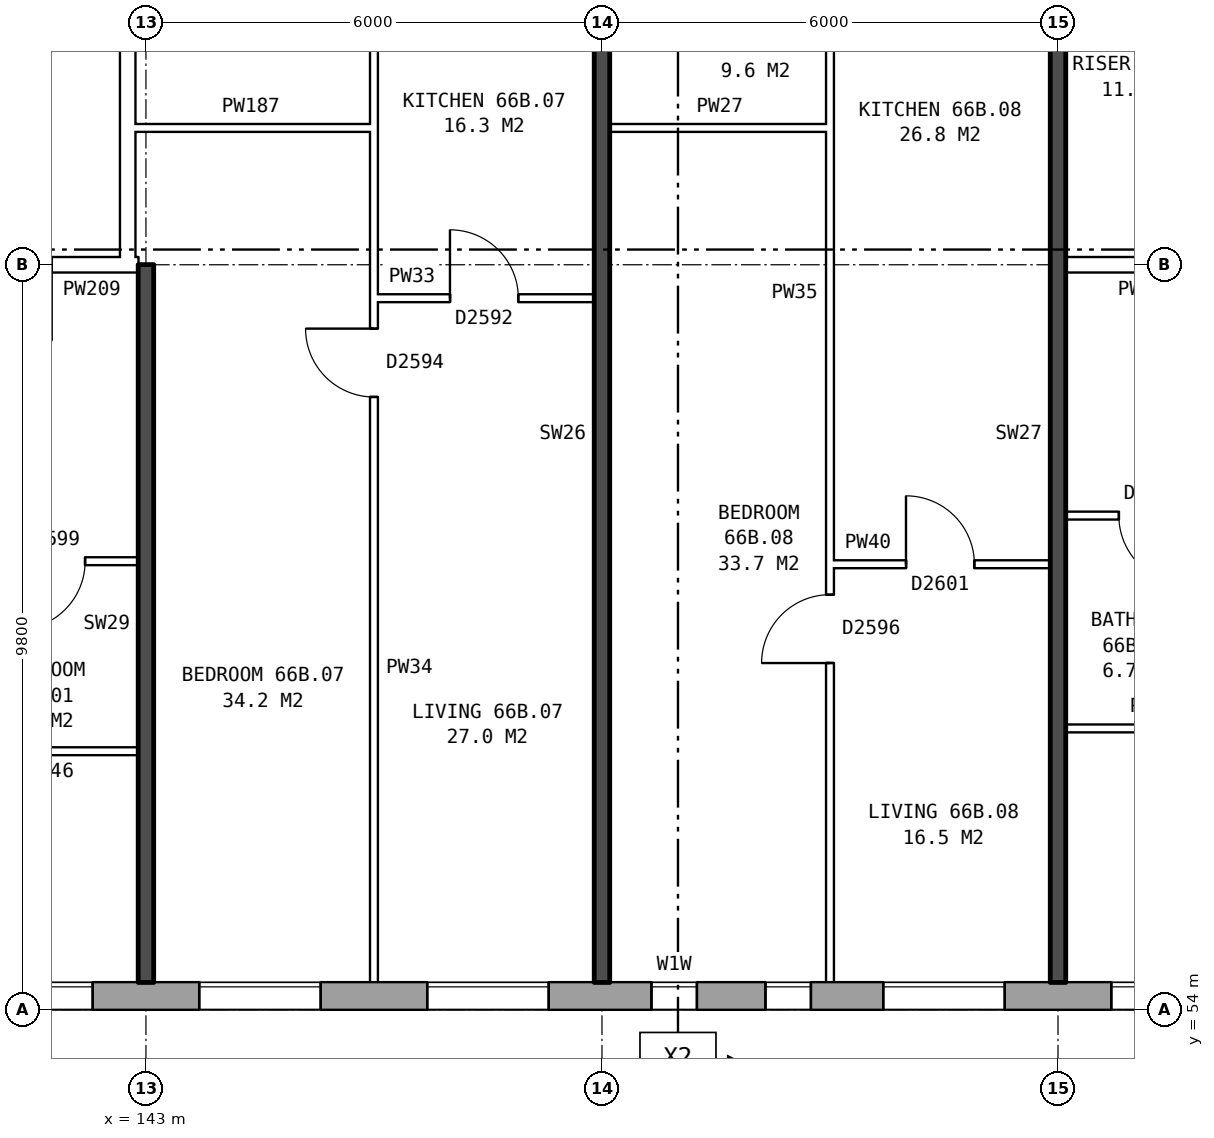
"""IFC4 building model, lengths in metres.
Left out: names, types, materials, properties, quantities, classifications, styles, units other than length and angle.
Written with IfcOpenShell. Run it as: python <this file> out.ifc"""

import sys

from ifc_helpers import new_model, si_unit, direction, frame, frame_2d, origin, place, context, subcontext, project, spatial, rectangle, extrude, element, fill, save


model = new_model("IFC4")
c1 = context("Model", 3, precision=1e-05, world=origin(), true_north=direction((0.0, 1.0)))
c2 = subcontext(c1, "Body", "Model", "MODEL_VIEW")
j1 = project(units=[si_unit("LENGTHUNIT", "METRE"), si_unit("PLANEANGLEUNIT", "RADIAN")], contexts=[c1])
p1 = place(None, origin())
s1 = spatial("IfcSite", under=j1, at=p1, CompositionType="ELEMENT")
p2 = place(p1, origin())
s2 = spatial("IfcBuilding", under=s1, at=p2, CompositionType="ELEMENT")
p3 = place(p2, frame((0.0, 0.0, 233.8)))
s3 = spatial("IfcBuildingStorey", under=s2, at=p3, CompositionType="ELEMENT", Elevation=233.8)
p4 = place(p3, frame((132.05, 54.18, 0.0), z_axis=(0.0, 0.0, 1.0), x_axis=(1.0, 0.0, 0.0)))
e1 = element("IfcWall", 1, at=p4, inside=s3, PredefinedType="STANDARD", context=c2, shape_type="SweptSolid", body=[
    extrude(rectangle(XDim=33.875, YDim=0.36, at=frame_2d((16.938, 0.0))), origin(), (0.0, 0.0, 1.0), 2.85),
])
p5 = place(p4, frame((2.65, 0.0, 0.8)))
e2 = element("IfcOpeningElement", 2, at=p5, cuts=e1, PredefinedType="OPENING", context=c2, shape_type="SweptSolid", body=[
    extrude(rectangle(XDim=1.6, YDim=1.8, at=frame_2d((0.8, 0.9))), frame((0.0, 0.19, 0.0), z_axis=(0.0, -1.0, 0.0), x_axis=(1.0, 0.0, 0.0)), (0.0, 0.0, 1.0), 0.38),
])
p6 = place(p4, frame((5.65, 0.0, 0.8)))
e3 = element("IfcOpeningElement", 3, at=p6, cuts=e1, PredefinedType="OPENING", context=c2, shape_type="SweptSolid", body=[
    extrude(rectangle(XDim=1.6, YDim=1.8, at=frame_2d((0.8, 0.9))), frame((0.0, 0.19, 0.0), z_axis=(0.0, -1.0, 0.0), x_axis=(1.0, 0.0, 0.0)), (0.0, 0.0, 1.0), 0.38),
])
p7 = place(p4, frame((8.65, 0.0, 0.8)))
e4 = element("IfcOpeningElement", 4, at=p7, cuts=e1, PredefinedType="OPENING", context=c2, shape_type="SweptSolid", body=[
    extrude(rectangle(XDim=1.6, YDim=1.8, at=frame_2d((0.8, 0.9))), frame((0.0, 0.19, 0.0), z_axis=(0.0, -1.0, 0.0), x_axis=(1.0, 0.0, 0.0)), (0.0, 0.0, 1.0), 0.38),
])
p8 = place(p4, frame((11.65, 0.0, 0.8)))
e5 = element("IfcOpeningElement", 5, at=p8, cuts=e1, PredefinedType="OPENING", context=c2, shape_type="SweptSolid", body=[
    extrude(rectangle(XDim=1.6, YDim=1.8, at=frame_2d((0.8, 0.9))), frame((0.0, 0.19, 0.0), z_axis=(0.0, -1.0, 0.0), x_axis=(1.0, 0.0, 0.0)), (0.0, 0.0, 1.0), 0.38),
])
p9 = place(p4, frame((14.65, 0.0, 0.8)))
e6 = element("IfcOpeningElement", 6, at=p9, cuts=e1, PredefinedType="OPENING", context=c2, shape_type="SweptSolid", body=[
    extrude(rectangle(XDim=1.6, YDim=1.8, at=frame_2d((0.8, 0.9))), frame((0.0, 0.19, 0.0), z_axis=(0.0, -1.0, 0.0), x_axis=(1.0, 0.0, 0.0)), (0.0, 0.0, 1.0), 0.38),
])
p10 = place(p4, frame((17.6, 0.0, 0.15)))
e7 = element("IfcOpeningElement", 7, at=p10, cuts=e1, PredefinedType="OPENING", context=c2, shape_type="SweptSolid", body=[
    extrude(rectangle(XDim=0.6, YDim=0.9, at=frame_2d((0.3, 0.45))), frame((0.0, 0.19, 0.0), z_axis=(0.0, -1.0, 0.0), x_axis=(1.0, 0.0, 0.0)), (0.0, 0.0, 1.0), 0.38),
])
p11 = place(p4, frame((20.65, 0.0, 0.8)))
e8 = element("IfcOpeningElement", 8, at=p11, cuts=e1, PredefinedType="OPENING", context=c2, shape_type="SweptSolid", body=[
    extrude(rectangle(XDim=1.6, YDim=1.8, at=frame_2d((0.8, 0.9))), frame((0.0, 0.19, 0.0), z_axis=(0.0, -1.0, 0.0), x_axis=(1.0, 0.0, 0.0)), (0.0, 0.0, 1.0), 0.38),
])
p12 = place(p4, frame((23.65, 0.0, 0.8)))
e9 = element("IfcOpeningElement", 9, at=p12, cuts=e1, PredefinedType="OPENING", context=c2, shape_type="SweptSolid", body=[
    extrude(rectangle(XDim=1.6, YDim=1.8, at=frame_2d((0.8, 0.9))), frame((0.0, 0.19, 0.0), z_axis=(0.0, -1.0, 0.0), x_axis=(1.0, 0.0, 0.0)), (0.0, 0.0, 1.0), 0.38),
])
p13 = place(p4, frame((26.65, 0.0, 0.8)))
e10 = element("IfcOpeningElement", 10, at=p13, cuts=e1, PredefinedType="OPENING", context=c2, shape_type="SweptSolid", body=[
    extrude(rectangle(XDim=1.6, YDim=1.8, at=frame_2d((0.8, 0.9))), frame((0.0, 0.19, 0.0), z_axis=(0.0, -1.0, 0.0), x_axis=(1.0, 0.0, 0.0)), (0.0, 0.0, 1.0), 0.38),
])
p14 = place(p4, frame((29.65, 0.0, 0.8)))
e11 = element("IfcOpeningElement", 11, at=p14, cuts=e1, PredefinedType="OPENING", context=c2, shape_type="SweptSolid", body=[
    extrude(rectangle(XDim=1.6, YDim=1.8, at=frame_2d((0.8, 0.9))), frame((0.0, 0.19, 0.0), z_axis=(0.0, -1.0, 0.0), x_axis=(1.0, 0.0, 0.0)), (0.0, 0.0, 1.0), 0.38),
])
p15 = place(p4, frame((19.1, 0.0, 1.65)))
e12 = element("IfcOpeningElement", 12, at=p15, cuts=e1, PredefinedType="OPENING", context=c2, shape_type="SweptSolid", body=[
    extrude(rectangle(XDim=0.6, YDim=0.9, at=frame_2d((0.3, 0.45))), frame((0.0, 0.19, 0.0), z_axis=(0.0, -1.0, 0.0), x_axis=(1.0, 0.0, 0.0)), (0.0, 0.0, 1.0), 0.38),
])
p16 = place(p3, frame((142.76, 63.9, 0.0), z_axis=(0.0, 0.0, 1.0), x_axis=(0.0, 1.0, 0.0)))
e13 = element("IfcWall", 13, at=p16, inside=s3, PredefinedType="PARTITIONING", context=c2, shape_type="SweptSolid", body=[
    extrude(rectangle(XDim=12.2, YDim=0.2, at=frame_2d((6.1, 0.0))), origin(), (0.0, 0.0, 1.0), 2.85),
])
p17 = place(p16, frame((5.1, 0.0, 0.0)))
e14 = element("IfcOpeningElement", 14, at=p17, cuts=e13, PredefinedType="OPENING", context=c2, shape_type="SweptSolid", body=[
    extrude(rectangle(XDim=2.0, YDim=2.1, at=frame_2d((1.0, 1.05))), frame((0.0, 0.11, 0.0), z_axis=(0.0, -1.0, 0.0), x_axis=(1.0, 0.0, 0.0)), (0.0, 0.0, 1.0), 0.22),
])
for number, where, z_axis, x_axis in (
    (15, (140.6, 57.4, 0.0), (0.0, 0.0, 1.0), (1.0, 0.0, 0.0)),
    (16, (155.1, 57.7, 0.0), (0.0, 0.0, 1.0), (1.0, 0.0, 0.0)),
):
    element("IfcWall", number, at=place(p3, frame(where, z_axis=z_axis, x_axis=x_axis)), inside=s3, PredefinedType="PARTITIONING", context=c2, shape_type="SweptSolid", body=[
        extrude(rectangle(XDim=2.3, YDim=0.1, at=frame_2d((1.15, 0.0))), origin(), (0.0, 0.0, 1.0), 2.85),
    ])
p18 = place(p3, frame((152.0, 59.86, 0.0), z_axis=(0.0, 0.0, 1.0), x_axis=(1.0, 0.0, 0.0)))
e17 = element("IfcWall", 17, at=p18, inside=s3, PredefinedType="PARTITIONING", context=c2, shape_type="SweptSolid", body=[
    extrude(rectangle(XDim=2.9, YDim=0.1, at=frame_2d((1.45, 0.0))), origin(), (0.0, 0.0, 1.0), 2.85),
])
p19 = place(p18, frame((1.0, 0.0, 0.0)))
e18 = element("IfcOpeningElement", 18, at=p19, cuts=e17, PredefinedType="OPENING", context=c2, shape_type="SweptSolid", body=[
    extrude(rectangle(XDim=0.9, YDim=2.1, at=frame_2d((0.45, 1.05))), frame((0.0, 0.06, 0.0), z_axis=(0.0, -1.0, 0.0), x_axis=(1.0, 0.0, 0.0)), (0.0, 0.0, 1.0), 0.12),
])
p20 = place(p3, frame((137.1, 59.9, 0.0), z_axis=(0.0, 0.0, 1.0), x_axis=(1.0, 0.0, 0.0)))
e19 = element("IfcWall", 19, at=p20, inside=s3, PredefinedType="PARTITIONING", context=c2, shape_type="SweptSolid", body=[
    extrude(rectangle(XDim=5.8, YDim=0.1, at=frame_2d((2.9, 0.0))), origin(), (0.0, 0.0, 1.0), 2.85),
])
p21 = place(p20, frame((1.3, 0.0, 0.0)))
e20 = element("IfcOpeningElement", 20, at=p21, cuts=e19, PredefinedType="OPENING", context=c2, shape_type="SweptSolid", body=[
    extrude(rectangle(XDim=0.9, YDim=2.1, at=frame_2d((0.45, 1.05))), frame((0.0, 0.06, 0.0), z_axis=(0.0, -1.0, 0.0), x_axis=(1.0, 0.0, 0.0)), (0.0, 0.0, 1.0), 0.12),
])
p22 = place(p20, frame((4.2, 0.0, 0.0)))
e21 = element("IfcOpeningElement", 21, at=p22, cuts=e19, PredefinedType="OPENING", context=c2, shape_type="SweptSolid", body=[
    extrude(rectangle(XDim=0.9, YDim=2.1, at=frame_2d((0.45, 1.05))), frame((0.0, 0.06, 0.0), z_axis=(0.0, -1.0, 0.0), x_axis=(1.0, 0.0, 0.0)), (0.0, 0.0, 1.0), 0.12),
])
p23 = place(p3, frame((155.1, 60.5, 0.0), z_axis=(0.0, 0.0, 1.0), x_axis=(1.0, 0.0, 0.0)))
e22 = element("IfcWall", 22, at=p23, inside=s3, PredefinedType="PARTITIONING", context=c2, shape_type="SweptSolid", body=[
    extrude(rectangle(XDim=5.8, YDim=0.1, at=frame_2d((2.9, 0.0))), origin(), (0.0, 0.0, 1.0), 2.85),
])
p24 = place(p23, frame((3.6, 0.0, 0.0)))
e23 = element("IfcOpeningElement", 23, at=p24, cuts=e22, PredefinedType="OPENING", context=c2, shape_type="SweptSolid", body=[
    extrude(rectangle(XDim=0.9, YDim=2.1, at=frame_2d((0.45, 1.05))), frame((0.0, 0.06, 0.0), z_axis=(0.0, -1.0, 0.0), x_axis=(1.0, 0.0, 0.0)), (0.0, 0.0, 1.0), 0.12),
])
p25 = place(p23, frame((0.7, 0.0, 0.0)))
e24 = element("IfcOpeningElement", 24, at=p25, cuts=e22, PredefinedType="OPENING", context=c2, shape_type="SweptSolid", body=[
    extrude(rectangle(XDim=0.9, YDim=2.1, at=frame_2d((0.45, 1.05))), frame((0.0, 0.06, 0.0), z_axis=(0.0, -1.0, 0.0), x_axis=(1.0, 0.0, 0.0)), (0.0, 0.0, 1.0), 0.12),
])
p26 = place(p3, frame((146.0, 63.36, 0.0), z_axis=(0.0, 0.0, 1.0), x_axis=(1.0, 0.0, 0.0)))
e25 = element("IfcWall", 25, at=p26, inside=s3, PredefinedType="PARTITIONING", context=c2, shape_type="SweptSolid", body=[
    extrude(rectangle(XDim=2.9, YDim=0.1, at=frame_2d((1.45, 0.0))), origin(), (0.0, 0.0, 1.0), 2.85),
])
p27 = place(p26, frame((1.0, 0.0, 0.0)))
e26 = element("IfcOpeningElement", 26, at=p27, cuts=e25, PredefinedType="OPENING", context=c2, shape_type="SweptSolid", body=[
    extrude(rectangle(XDim=0.9, YDim=2.1, at=frame_2d((0.45, 1.05))), frame((0.0, 0.06, 0.0), z_axis=(0.0, -1.0, 0.0), x_axis=(1.0, 0.0, 0.0)), (0.0, 0.0, 1.0), 0.12),
])
p28 = place(p3, frame((139.76, 63.8, 0.0), z_axis=(0.0, 0.0, 1.0), x_axis=(1.0, 0.0, 0.0)))
e27 = element("IfcWall", 27, at=p28, inside=s3, PredefinedType="PARTITIONING", context=c2, shape_type="SweptSolid", body=[
    extrude(rectangle(XDim=3.0, YDim=0.2, at=frame_2d((1.5, 0.0))), origin(), (0.0, 0.0, 1.0), 2.85),
])
p29 = place(p28, frame((1.0, 0.0, 0.0)))
e28 = element("IfcOpeningElement", 28, at=p29, cuts=e27, PredefinedType="OPENING", context=c2, shape_type="SweptSolid", body=[
    extrude(rectangle(XDim=1.0, YDim=2.1, at=frame_2d((0.5, 1.05))), frame((0.0, 0.11, 0.0), z_axis=(0.0, -1.0, 0.0), x_axis=(1.0, 0.0, 0.0)), (0.0, 0.0, 1.0), 0.22),
])
p30 = place(p3, frame((142.76, 63.8, 0.0), z_axis=(0.0, 0.0, 1.0), x_axis=(1.0, 0.0, 0.0)))
e29 = element("IfcWall", 29, at=p30, inside=s3, PredefinedType="PARTITIONING", context=c2, shape_type="SweptSolid", body=[
    extrude(rectangle(XDim=0.14, YDim=0.2, at=frame_2d((0.07, 0.0))), origin(), (0.0, 0.0, 1.0), 2.85),
])
p31 = place(p3, frame((155.1, 63.8, 0.0), z_axis=(0.0, 0.0, 1.0), x_axis=(1.0, 0.0, 0.0)))
e30 = element("IfcWall", 30, at=p31, inside=s3, PredefinedType="PARTITIONING", context=c2, shape_type="SweptSolid", body=[
    extrude(rectangle(XDim=2.14, YDim=0.2, at=frame_2d((1.07, 0.0))), origin(), (0.0, 0.0, 1.0), 2.85),
])
p32 = place(p3, frame((142.76, 65.6, 0.0), z_axis=(0.0, 0.0, 1.0), x_axis=(1.0, 0.0, 0.0)))
e31 = element("IfcWall", 31, at=p32, inside=s3, PredefinedType="PARTITIONING", context=c2, shape_type="SweptSolid", body=[
    extrude(rectangle(XDim=3.24, YDim=0.1, at=frame_2d((1.62, 0.0))), origin(), (0.0, 0.0, 1.0), 2.85),
])
p33 = place(p3, frame((149.1, 65.6, 0.0), z_axis=(0.0, 0.0, 1.0), x_axis=(1.0, 0.0, 0.0)))
e32 = element("IfcWall", 32, at=p33, inside=s3, PredefinedType="PARTITIONING", context=c2, shape_type="SweptSolid", body=[
    extrude(rectangle(XDim=2.9, YDim=0.1, at=frame_2d((1.45, 0.0))), origin(), (0.0, 0.0, 1.0), 2.85),
])
p34 = place(p3, frame((143.0, 54.36, 0.0), z_axis=(0.0, 0.0, 1.0), x_axis=(0.0, 1.0, 0.0)))
e33 = element("IfcWall", 33, at=p34, inside=s3, PredefinedType="SOLIDWALL", context=c2, shape_type="SweptSolid", body=[
    extrude(rectangle(XDim=9.44, YDim=0.2, at=frame_2d((4.72, 0.0))), origin(), (0.0, 0.0, 1.0), 2.85),
])
p35 = place(p3, frame((146.0, 54.36, 0.0), z_axis=(0.0, 0.0, 1.0), x_axis=(0.0, 1.0, 0.0)))
e34 = element("IfcWall", 34, at=p35, inside=s3, PredefinedType="PARTITIONING", context=c2, shape_type="SweptSolid", body=[
    extrude(rectangle(XDim=14.34, YDim=0.1, at=frame_2d((7.17, 0.0))), origin(), (0.0, 0.0, 1.0), 2.85),
])
p36 = place(p35, frame((7.7, 0.0, 0.0)))
e35 = element("IfcOpeningElement", 35, at=p36, cuts=e34, PredefinedType="OPENING", context=c2, shape_type="SweptSolid", body=[
    extrude(rectangle(XDim=0.9, YDim=2.1, at=frame_2d((0.45, 1.05))), frame((0.0, 0.06, 0.0), z_axis=(0.0, -1.0, 0.0), x_axis=(1.0, 0.0, 0.0)), (0.0, 0.0, 1.0), 0.12),
])
p37 = place(p35, frame((13.04, 0.0, 0.0)))
e36 = element("IfcOpeningElement", 36, at=p37, cuts=e34, PredefinedType="OPENING", context=c2, shape_type="SweptSolid", body=[
    extrude(rectangle(XDim=0.9, YDim=2.1, at=frame_2d((0.45, 1.05))), frame((0.0, 0.06, 0.0), z_axis=(0.0, -1.0, 0.0), x_axis=(1.0, 0.0, 0.0)), (0.0, 0.0, 1.0), 0.12),
])
p38 = place(p3, frame((149.0, 54.36, 0.0), z_axis=(0.0, 0.0, 1.0), x_axis=(0.0, 1.0, 0.0)))
e37 = element("IfcWall", 37, at=p38, inside=s3, PredefinedType="SOLIDWALL", context=c2, shape_type="SweptSolid", body=[
    extrude(rectangle(XDim=14.44, YDim=0.2, at=frame_2d((7.22, 0.0))), origin(), (0.0, 0.0, 1.0), 2.85),
])
p39 = place(p3, frame((152.0, 54.36, 0.0), z_axis=(0.0, 0.0, 1.0), x_axis=(0.0, 1.0, 0.0)))
e38 = element("IfcWall", 38, at=p39, inside=s3, PredefinedType="PARTITIONING", context=c2, shape_type="SweptSolid", body=[
    extrude(rectangle(XDim=14.34, YDim=0.1, at=frame_2d((7.17, 0.0))), origin(), (0.0, 0.0, 1.0), 2.85),
])
p40 = place(p39, frame((4.2, 0.0, 0.0)))
e39 = element("IfcOpeningElement", 39, at=p40, cuts=e38, PredefinedType="OPENING", context=c2, shape_type="SweptSolid", body=[
    extrude(rectangle(XDim=0.9, YDim=2.1, at=frame_2d((0.45, 1.05))), frame((0.0, 0.06, 0.0), z_axis=(0.0, -1.0, 0.0), x_axis=(1.0, 0.0, 0.0)), (0.0, 0.0, 1.0), 0.12),
])
p41 = place(p39, frame((13.04, 0.0, 0.0)))
e40 = element("IfcOpeningElement", 40, at=p41, cuts=e38, PredefinedType="OPENING", context=c2, shape_type="SweptSolid", body=[
    extrude(rectangle(XDim=0.9, YDim=2.1, at=frame_2d((0.45, 1.05))), frame((0.0, 0.06, 0.0), z_axis=(0.0, -1.0, 0.0), x_axis=(1.0, 0.0, 0.0)), (0.0, 0.0, 1.0), 0.12),
])
p42 = place(p3, frame((155.0, 54.36, 0.0), z_axis=(0.0, 0.0, 1.0), x_axis=(0.0, 1.0, 0.0)))
e41 = element("IfcWall", 41, at=p42, inside=s3, PredefinedType="SOLIDWALL", context=c2, shape_type="SweptSolid", body=[
    extrude(rectangle(XDim=14.44, YDim=0.2, at=frame_2d((7.22, 0.0))), origin(), (0.0, 0.0, 1.0), 2.85),
])
p43 = place(p7, origin())
e42 = element("IfcWindow", 42, at=p43, inside=s3, PartitioningType="SINGLE_PANEL", PredefinedType="WINDOW", context=c2, shape_type="SweptSolid", body=[
    extrude(rectangle(XDim=1.6, YDim=1.8, at=frame_2d((0.8, 0.9))), frame((0.0, 0.15, 0.0), z_axis=(0.0, -1.0, 0.0), x_axis=(1.0, 0.0, 0.0)), (0.0, 0.0, 1.0), 0.06),
])
fill(e4, e42)
p44 = place(p8, origin())
e43 = element("IfcWindow", 43, at=p44, inside=s3, PartitioningType="SINGLE_PANEL", PredefinedType="WINDOW", context=c2, shape_type="SweptSolid", body=[
    extrude(rectangle(XDim=1.6, YDim=1.8, at=frame_2d((0.8, 0.9))), frame((0.0, 0.15, 0.0), z_axis=(0.0, -1.0, 0.0), x_axis=(1.0, 0.0, 0.0)), (0.0, 0.0, 1.0), 0.06),
])
fill(e5, e43)
p45 = place(p9, origin())
e44 = element("IfcWindow", 44, at=p45, inside=s3, PartitioningType="SINGLE_PANEL", PredefinedType="WINDOW", context=c2, shape_type="SweptSolid", body=[
    extrude(rectangle(XDim=1.6, YDim=1.8, at=frame_2d((0.8, 0.9))), frame((0.0, 0.15, 0.0), z_axis=(0.0, -1.0, 0.0), x_axis=(1.0, 0.0, 0.0)), (0.0, 0.0, 1.0), 0.06),
])
fill(e6, e44)
p46 = place(p10, origin())
e45 = element("IfcWindow", 45, at=p46, inside=s3, PartitioningType="SINGLE_PANEL", PredefinedType="WINDOW", context=c2, shape_type="SweptSolid", body=[
    extrude(rectangle(XDim=0.6, YDim=0.9, at=frame_2d((0.3, 0.45))), frame((0.0, 0.15, 0.0), z_axis=(0.0, -1.0, 0.0), x_axis=(1.0, 0.0, 0.0)), (0.0, 0.0, 1.0), 0.06),
])
fill(e7, e45)
p47 = place(p11, origin())
e46 = element("IfcWindow", 46, at=p47, inside=s3, PartitioningType="SINGLE_PANEL", PredefinedType="WINDOW", context=c2, shape_type="SweptSolid", body=[
    extrude(rectangle(XDim=1.6, YDim=1.8, at=frame_2d((0.8, 0.9))), frame((0.0, 0.15, 0.0), z_axis=(0.0, -1.0, 0.0), x_axis=(1.0, 0.0, 0.0)), (0.0, 0.0, 1.0), 0.06),
])
fill(e8, e46)
p48 = place(p12, origin())
e47 = element("IfcWindow", 47, at=p48, inside=s3, PartitioningType="SINGLE_PANEL", PredefinedType="WINDOW", context=c2, shape_type="SweptSolid", body=[
    extrude(rectangle(XDim=1.6, YDim=1.8, at=frame_2d((0.8, 0.9))), frame((0.0, 0.15, 0.0), z_axis=(0.0, -1.0, 0.0), x_axis=(1.0, 0.0, 0.0)), (0.0, 0.0, 1.0), 0.06),
])
fill(e9, e47)
p49 = place(p22, frame((0.9, 0.0, 0.0), z_axis=(0.0, 0.0, 1.0), x_axis=(-1.0, 0.0, 0.0)))
e48 = element("IfcDoor", 48, at=p49, inside=s3, OperationType="SINGLE_SWING_RIGHT", PredefinedType="DOOR", context=c2, shape_type="SweptSolid", body=[
    extrude(rectangle(XDim=0.9, YDim=2.1, at=frame_2d((0.45, 1.05))), frame((0.0, 0.025, 0.0), z_axis=(0.0, -1.0, 0.0), x_axis=(1.0, 0.0, 0.0)), (0.0, 0.0, 1.0), 0.05),
])
fill(e21, e48)
p50 = place(p25, frame((0.9, 0.0, 0.0), z_axis=(0.0, 0.0, 1.0), x_axis=(-1.0, 0.0, 0.0)))
e49 = element("IfcDoor", 49, at=p50, inside=s3, OperationType="SINGLE_SWING_LEFT", PredefinedType="DOOR", context=c2, shape_type="SweptSolid", body=[
    extrude(rectangle(XDim=0.9, YDim=2.1, at=frame_2d((0.45, 1.05))), frame((0.0, 0.025, 0.0), z_axis=(0.0, -1.0, 0.0), x_axis=(1.0, 0.0, 0.0)), (0.0, 0.0, 1.0), 0.05),
])
fill(e24, e49)
p51 = place(p36, origin())
e50 = element("IfcDoor", 50, at=p51, inside=s3, OperationType="SINGLE_SWING_RIGHT", PredefinedType="DOOR", context=c2, shape_type="SweptSolid", body=[
    extrude(rectangle(XDim=0.9, YDim=2.1, at=frame_2d((0.45, 1.05))), frame((0.0, 0.025, 0.0), z_axis=(0.0, -1.0, 0.0), x_axis=(1.0, 0.0, 0.0)), (0.0, 0.0, 1.0), 0.05),
])
fill(e35, e50)
p52 = place(p27, origin())
e51 = element("IfcDoor", 51, at=p52, inside=s3, OperationType="SINGLE_SWING_LEFT", PredefinedType="DOOR", context=c2, shape_type="SweptSolid", body=[
    extrude(rectangle(XDim=0.9, YDim=2.1, at=frame_2d((0.45, 1.05))), frame((0.0, 0.025, 0.0), z_axis=(0.0, -1.0, 0.0), x_axis=(1.0, 0.0, 0.0)), (0.0, 0.0, 1.0), 0.05),
])
fill(e26, e51)
p53 = place(p40, origin())
e52 = element("IfcDoor", 52, at=p53, inside=s3, OperationType="SINGLE_SWING_LEFT", PredefinedType="DOOR", context=c2, shape_type="SweptSolid", body=[
    extrude(rectangle(XDim=0.9, YDim=2.1, at=frame_2d((0.45, 1.05))), frame((0.0, 0.025, 0.0), z_axis=(0.0, -1.0, 0.0), x_axis=(1.0, 0.0, 0.0)), (0.0, 0.0, 1.0), 0.05),
])
fill(e39, e52)
p54 = place(p19, origin())
e53 = element("IfcDoor", 53, at=p54, inside=s3, OperationType="SINGLE_SWING_LEFT", PredefinedType="DOOR", context=c2, shape_type="SweptSolid", body=[
    extrude(rectangle(XDim=0.9, YDim=2.1, at=frame_2d((0.45, 1.05))), frame((0.0, 0.025, 0.0), z_axis=(0.0, -1.0, 0.0), x_axis=(1.0, 0.0, 0.0)), (0.0, 0.0, 1.0), 0.05),
])
fill(e18, e53)
p55 = place(p15, origin())
e54 = element("IfcWindow", 54, at=p55, inside=s3, PartitioningType="SINGLE_PANEL", PredefinedType="WINDOW", context=c2, shape_type="SweptSolid", body=[
    extrude(rectangle(XDim=0.6, YDim=0.9, at=frame_2d((0.3, 0.45))), frame((0.0, 0.15, 0.0), z_axis=(0.0, -1.0, 0.0), x_axis=(1.0, 0.0, 0.0)), (0.0, 0.0, 1.0), 0.06),
])
fill(e12, e54)
save(model, sys.argv[1])
